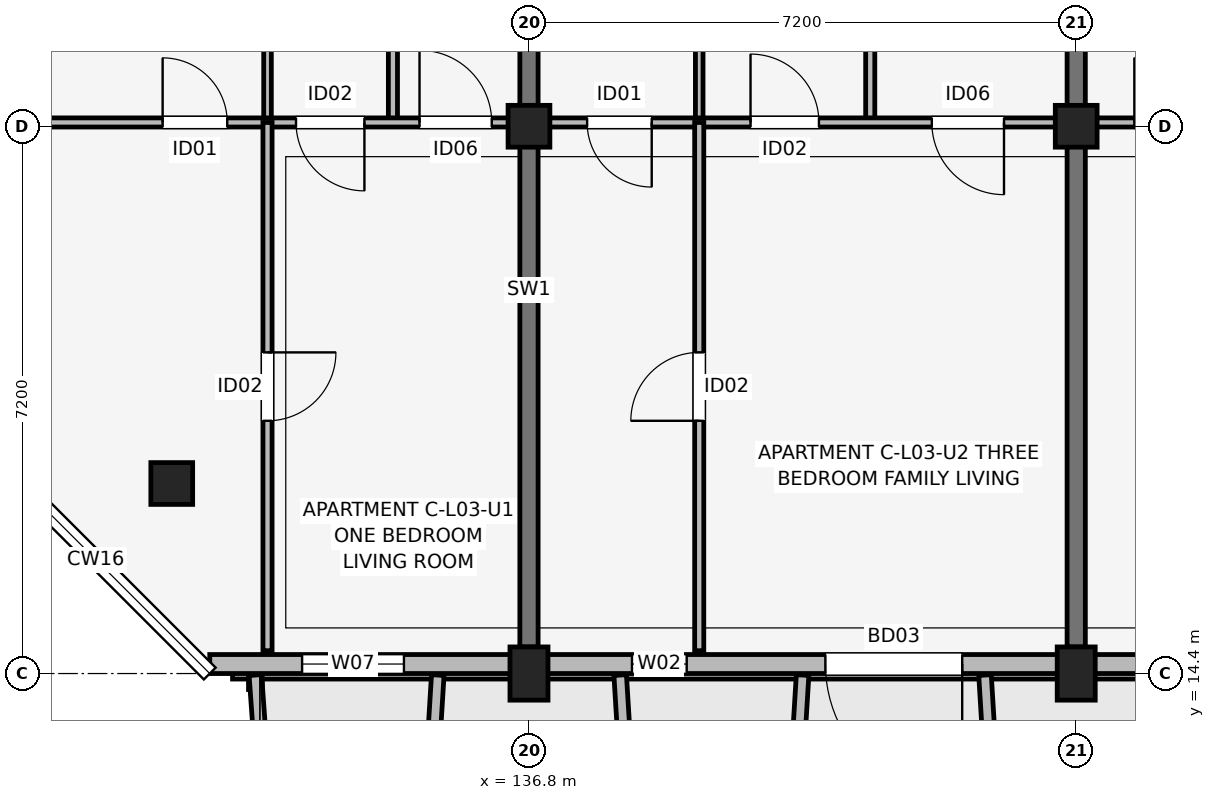
"""IFC4 building model, lengths in metres.
Left out: names, types, materials, properties, quantities, classifications, styles, units other than length and angle.
Written with IfcOpenShell. Run it as: python <this file> out.ifc"""

import sys

from ifc_helpers import new_model, si_unit, direction, frame, frame_2d, origin, origin_2d, place, context, subcontext, project, spatial, rectangle, extrude, element, fill, save


model = new_model("IFC4")
c1 = context("Model", 3, precision=1e-05, world=origin(), true_north=direction((0.0, 1.0)))
c2 = subcontext(c1, "Body", "Model", "MODEL_VIEW")
j1 = project(units=[si_unit("LENGTHUNIT", "METRE"), si_unit("PLANEANGLEUNIT", "RADIAN")], contexts=[c1])
p1 = place(None, origin())
s1 = spatial("IfcSite", under=j1, at=p1, CompositionType="ELEMENT")
p2 = place(p1, origin())
s2 = spatial("IfcBuilding", under=s1, at=p2, CompositionType="ELEMENT")
p3 = place(p2, frame((0.0, 0.0, 11.85)))
s3 = spatial("IfcBuildingStorey", under=s2, at=p3, CompositionType="ELEMENT", Elevation=11.85)
p4 = place(p3, frame((132.1, 16.9, 0.0), z_axis=(0.0, 0.0, 1.0), x_axis=(1.0, 0.0, 0.0)))
e1 = element("IfcColumn", 1, at=p4, inside=s3, PredefinedType="COLUMN", context=c2, shape_type="SweptSolid", body=[
    extrude(rectangle(XDim=0.55, YDim=0.55, at=origin_2d()), origin(), (0.0, 0.0, 1.0), 3.15),
])
p5 = place(p3, frame((136.8, 14.4, 0.0), z_axis=(0.0, 0.0, 1.0), x_axis=(1.0, 0.0, 0.0)))
e2 = element("IfcColumn", 2, at=p5, inside=s3, PredefinedType="COLUMN", context=c2, shape_type="SweptSolid", body=[
    extrude(rectangle(XDim=0.5, YDim=0.7, at=origin_2d()), origin(), (0.0, 0.0, 1.0), 3.15),
])
p6 = place(p3, frame((136.8, 21.6, 0.0), z_axis=(0.0, 0.0, 1.0), x_axis=(1.0, 0.0, 0.0)))
e3 = element("IfcColumn", 3, at=p6, inside=s3, PredefinedType="COLUMN", context=c2, shape_type="SweptSolid", body=[
    extrude(rectangle(XDim=0.55, YDim=0.55, at=origin_2d()), origin(), (0.0, 0.0, 1.0), 3.15),
])
p7 = place(p3, frame((144.0, 14.4, 0.0), z_axis=(0.0, 0.0, 1.0), x_axis=(1.0, 0.0, 0.0)))
e4 = element("IfcColumn", 4, at=p7, inside=s3, PredefinedType="COLUMN", context=c2, shape_type="SweptSolid", body=[
    extrude(rectangle(XDim=0.5, YDim=0.7, at=origin_2d()), origin(), (0.0, 0.0, 1.0), 3.15),
])
p8 = place(p3, frame((144.0, 21.6, 0.0), z_axis=(0.0, 0.0, 1.0), x_axis=(1.0, 0.0, 0.0)))
e5 = element("IfcColumn", 5, at=p8, inside=s3, PredefinedType="COLUMN", context=c2, shape_type="SweptSolid", body=[
    extrude(rectangle(XDim=0.55, YDim=0.55, at=origin_2d()), origin(), (0.0, 0.0, 1.0), 3.15),
])
for number, where, z_axis, x_axis in (
    (6, (136.8, 14.75, 0.0), (0.0, 0.0, 1.0), (0.0, 1.0, 0.0)),
    (7, (144.0, 14.75, 0.0), (0.0, 0.0, 1.0), (0.0, 1.0, 0.0)),
):
    element("IfcWall", number, at=place(p3, frame(where, z_axis=z_axis, x_axis=x_axis)), inside=s3, PredefinedType="SHEAR", context=c2, shape_type="SweptSolid", body=[
        extrude(rectangle(XDim=9.4, YDim=0.24, at=frame_2d((4.7, 0.0))), origin(), (0.0, 0.0, 1.0), 3.15),
    ])
p9 = place(p3, frame((132.6, 14.525, 0.0), z_axis=(0.0, 0.0, 1.0), x_axis=(1.0, 0.0, 0.0)))
e8 = element("IfcWall", 8, at=p9, inside=s3, PredefinedType="SOLIDWALL", context=c2, shape_type="SweptSolid", body=[
    extrude(rectangle(XDim=30.0, YDim=0.25, at=frame_2d((15.0, 0.0))), origin(), (0.0, 0.0, 1.0), 2.43),
])
p10 = place(p9, frame((9.9, 0.0, 0.0), z_axis=(0.0, 0.0, 1.0), x_axis=(-1.0, 0.0, 0.0)))
e9 = element("IfcOpeningElement", 9, at=p10, cuts=e8, PredefinedType="OPENING", context=c2, shape_type="SweptSolid", body=[
    extrude(rectangle(XDim=1.8, YDim=2.15, at=frame_2d((0.9, 1.075))), frame((0.0, 0.135, 0.0), z_axis=(0.0, -1.0, 0.0), x_axis=(1.0, 0.0, 0.0)), (0.0, 0.0, 1.0), 0.27),
])
p11 = place(p9, frame((24.225, 0.0, 0.0), z_axis=(0.0, 0.0, 1.0), x_axis=(-1.0, 0.0, 0.0)))
e10 = element("IfcOpeningElement", 10, at=p11, cuts=e8, PredefinedType="OPENING", context=c2, shape_type="SweptSolid", body=[
    extrude(rectangle(XDim=1.65, YDim=2.15, at=frame_2d((0.825, 1.075))), frame((0.0, 0.135, 0.0), z_axis=(0.0, -1.0, 0.0), x_axis=(1.0, 0.0, 0.0)), (0.0, 0.0, 1.0), 0.27),
])
p12 = place(p9, frame((1.215, 0.0, 0.75)))
e11 = element("IfcOpeningElement", 11, at=p12, cuts=e8, PredefinedType="OPENING", context=c2, shape_type="SweptSolid", body=[
    extrude(rectangle(XDim=1.34, YDim=1.55, at=frame_2d((0.67, 0.775))), frame((0.0, 0.135, 0.0), z_axis=(0.0, -1.0, 0.0), x_axis=(1.0, 0.0, 0.0)), (0.0, 0.0, 1.0), 0.27),
])
p13 = place(p9, frame((5.555, 0.0, 0.75)))
e12 = element("IfcOpeningElement", 12, at=p13, cuts=e8, PredefinedType="OPENING", context=c2, shape_type="SweptSolid", body=[
    extrude(rectangle(XDim=0.72, YDim=1.35, at=frame_2d((0.36, 0.675))), frame((0.0, 0.135, 0.0), z_axis=(0.0, -1.0, 0.0), x_axis=(1.0, 0.0, 0.0)), (0.0, 0.0, 1.0), 0.27),
])
p14 = place(p9, frame((12.94, 0.0, 0.7)))
e13 = element("IfcOpeningElement", 13, at=p14, cuts=e8, PredefinedType="OPENING", context=c2, shape_type="SweptSolid", body=[
    extrude(rectangle(XDim=1.72, YDim=1.6, at=frame_2d((0.86, 0.8))), frame((0.0, 0.135, 0.0), z_axis=(0.0, -1.0, 0.0), x_axis=(1.0, 0.0, 0.0)), (0.0, 0.0, 1.0), 0.27),
])
p15 = place(p9, frame((19.955, 0.0, 0.75)))
e14 = element("IfcOpeningElement", 14, at=p15, cuts=e8, PredefinedType="OPENING", context=c2, shape_type="SweptSolid", body=[
    extrude(rectangle(XDim=0.72, YDim=1.35, at=frame_2d((0.36, 0.675))), frame((0.0, 0.135, 0.0), z_axis=(0.0, -1.0, 0.0), x_axis=(1.0, 0.0, 0.0)), (0.0, 0.0, 1.0), 0.27),
])
p16 = place(p9, frame((27.2, 0.0, 0.67)))
e15 = element("IfcOpeningElement", 15, at=p16, cuts=e8, PredefinedType="OPENING", context=c2, shape_type="SweptSolid", body=[
    extrude(rectangle(XDim=2.0, YDim=1.65, at=frame_2d((1.0, 0.825))), frame((0.0, 0.135, 0.0), z_axis=(0.0, -1.0, 0.0), x_axis=(1.0, 0.0, 0.0)), (0.0, 0.0, 1.0), 0.27),
])
p17 = place(p3, frame((133.2, 14.38, 0.0), z_axis=(0.0, 0.0, 1.0), x_axis=(0.071317687608, -0.997453651772, 0.0)))
e16 = element("IfcWall", 16, at=p17, inside=s3, PredefinedType="ELEMENTEDWALL", context=c2, shape_type="SweptSolid", body=[
    extrude(rectangle(XDim=1.965, YDim=0.165, at=frame_2d((0.982, 0.0))), origin(), (0.0, 0.0, 1.0), 2.95),
])
p18 = place(p3, frame((135.6, 14.38, 0.0), z_axis=(0.0, 0.0, 1.0), x_axis=(-0.061170732449, -0.998127317276, 0.0)))
e17 = element("IfcWall", 17, at=p18, inside=s3, PredefinedType="ELEMENTEDWALL", context=c2, shape_type="SweptSolid", body=[
    extrude(rectangle(XDim=1.964, YDim=0.165, at=frame_2d((0.982, 0.0))), origin(), (0.0, 0.0, 1.0), 2.95),
])
for number, where, z_axis, x_axis in (
    (18, (138.0, 14.38, 0.0), (0.0, 0.0, 1.0), (0.061, -0.998, 0.0)),
    (19, (140.4, 14.38, 0.0), (0.0, 0.0, 1.0), (-0.061, -0.998, 0.0)),
    (20, (142.8, 14.38, 0.0), (0.0, 0.0, 1.0), (0.061, -0.998, 0.0)),
):
    element("IfcWall", number, at=place(p3, frame(where, z_axis=z_axis, x_axis=x_axis)), inside=s3, PredefinedType="ELEMENTEDWALL", context=c2, shape_type="SweptSolid", body=[
        extrude(rectangle(XDim=1.964, YDim=0.165, at=frame_2d((0.982, 0.0))), origin(), (0.0, 0.0, 1.0), 2.48),
    ])
p19 = place(p3, frame((133.36, 21.65, 0.0), z_axis=(0.0, 0.0, 1.0), x_axis=(0.0, 1.0, 0.0)))
e21 = element("IfcWall", 21, at=p19, inside=s3, PredefinedType="PARTITIONING", context=c2, shape_type="SweptSolid", body=[
    extrude(rectangle(XDim=2.65, YDim=0.1, at=frame_2d((1.325, 0.0))), origin(), (0.0, 0.0, 1.0), 2.375),
])
p20 = place(p3, frame((135.01, 21.65, 0.0), z_axis=(0.0, 0.0, 1.0), x_axis=(0.0, 1.0, 0.0)))
e22 = element("IfcWall", 22, at=p20, inside=s3, PredefinedType="PARTITIONING", context=c2, shape_type="SweptSolid", body=[
    extrude(rectangle(XDim=2.65, YDim=0.12, at=frame_2d((1.325, 0.0))), origin(), (0.0, 0.0, 1.0), 2.375),
])
p21 = place(p3, frame((129.74, 21.65, 0.0), z_axis=(0.0, 0.0, 1.0), x_axis=(1.0, 0.0, 0.0)))
e23 = element("IfcWall", 23, at=p21, inside=s3, PredefinedType="PARTITIONING", context=c2, shape_type="SweptSolid", body=[
    extrude(rectangle(XDim=6.92, YDim=0.12, at=frame_2d((3.46, 0.0))), origin(), (0.0, 0.0, 1.0), 2.375),
])
p22 = place(p21, frame((2.24, 0.0, 0.0)))
e24 = element("IfcOpeningElement", 24, at=p22, cuts=e23, PredefinedType="OPENING", context=c2, shape_type="SweptSolid", body=[
    extrude(rectangle(XDim=0.85, YDim=2.08, at=frame_2d((0.425, 1.04))), frame((0.0, 0.07, 0.0), z_axis=(0.0, -1.0, 0.0), x_axis=(1.0, 0.0, 0.0)), (0.0, 0.0, 1.0), 0.14),
])
p23 = place(p21, frame((4.895, 0.0, 0.0), z_axis=(0.0, 0.0, 1.0), x_axis=(-1.0, 0.0, 0.0)))
e25 = element("IfcOpeningElement", 25, at=p23, cuts=e23, PredefinedType="OPENING", context=c2, shape_type="SweptSolid", body=[
    extrude(rectangle(XDim=0.9, YDim=2.08, at=frame_2d((0.45, 1.04))), frame((0.0, 0.07, 0.0), z_axis=(0.0, -1.0, 0.0), x_axis=(1.0, 0.0, 0.0)), (0.0, 0.0, 1.0), 0.14),
])
p24 = place(p21, frame((5.62, 0.0, 0.0)))
e26 = element("IfcOpeningElement", 26, at=p24, cuts=e23, PredefinedType="OPENING", context=c2, shape_type="SweptSolid", body=[
    extrude(rectangle(XDim=0.95, YDim=2.08, at=frame_2d((0.475, 1.04))), frame((0.0, 0.07, 0.0), z_axis=(0.0, -1.0, 0.0), x_axis=(1.0, 0.0, 0.0)), (0.0, 0.0, 1.0), 0.14),
])
p25 = place(p3, frame((133.36, 14.7, 0.0), z_axis=(0.0, 0.0, 1.0), x_axis=(0.0, 1.0, 0.0)))
e27 = element("IfcWall", 27, at=p25, inside=s3, PredefinedType="PARTITIONING", context=c2, shape_type="SweptSolid", body=[
    extrude(rectangle(XDim=6.95, YDim=0.12, at=frame_2d((3.475, 0.0))), origin(), (0.0, 0.0, 1.0), 2.375),
])
p26 = place(p25, frame((3.925, 0.0, 0.0), z_axis=(0.0, 0.0, 1.0), x_axis=(-1.0, 0.0, 0.0)))
e28 = element("IfcOpeningElement", 28, at=p26, cuts=e27, PredefinedType="OPENING", context=c2, shape_type="SweptSolid", body=[
    extrude(rectangle(XDim=0.9, YDim=2.08, at=frame_2d((0.45, 1.04))), frame((0.0, 0.07, 0.0), z_axis=(0.0, -1.0, 0.0), x_axis=(1.0, 0.0, 0.0)), (0.0, 0.0, 1.0), 0.14),
])
p27 = place(p3, frame((139.04, 21.65, 0.0), z_axis=(0.0, 0.0, 1.0), x_axis=(0.0, 1.0, 0.0)))
e29 = element("IfcWall", 29, at=p27, inside=s3, PredefinedType="PARTITIONING", context=c2, shape_type="SweptSolid", body=[
    extrude(rectangle(XDim=2.65, YDim=0.1, at=frame_2d((1.325, 0.0))), origin(), (0.0, 0.0, 1.0), 2.375),
])
p28 = place(p3, frame((141.29, 21.65, 0.0), z_axis=(0.0, 0.0, 1.0), x_axis=(0.0, 1.0, 0.0)))
e30 = element("IfcWall", 30, at=p28, inside=s3, PredefinedType="PARTITIONING", context=c2, shape_type="SweptSolid", body=[
    extrude(rectangle(XDim=2.65, YDim=0.12, at=frame_2d((1.325, 0.0))), origin(), (0.0, 0.0, 1.0), 2.375),
])
p29 = place(p3, frame((136.94, 21.65, 0.0), z_axis=(0.0, 0.0, 1.0), x_axis=(1.0, 0.0, 0.0)))
e31 = element("IfcWall", 31, at=p29, inside=s3, PredefinedType="PARTITIONING", context=c2, shape_type="SweptSolid", body=[
    extrude(rectangle(XDim=6.92, YDim=0.12, at=frame_2d((3.46, 0.0))), origin(), (0.0, 0.0, 1.0), 2.375),
])
p30 = place(p29, frame((1.475, 0.0, 0.0), z_axis=(0.0, 0.0, 1.0), x_axis=(-1.0, 0.0, 0.0)))
e32 = element("IfcOpeningElement", 32, at=p30, cuts=e31, PredefinedType="OPENING", context=c2, shape_type="SweptSolid", body=[
    extrude(rectangle(XDim=0.85, YDim=2.08, at=frame_2d((0.425, 1.04))), frame((0.0, 0.07, 0.0), z_axis=(0.0, -1.0, 0.0), x_axis=(1.0, 0.0, 0.0)), (0.0, 0.0, 1.0), 0.14),
])
p31 = place(p29, frame((2.775, 0.0, 0.0)))
e33 = element("IfcOpeningElement", 33, at=p31, cuts=e31, PredefinedType="OPENING", context=c2, shape_type="SweptSolid", body=[
    extrude(rectangle(XDim=0.9, YDim=2.08, at=frame_2d((0.45, 1.04))), frame((0.0, 0.07, 0.0), z_axis=(0.0, -1.0, 0.0), x_axis=(1.0, 0.0, 0.0)), (0.0, 0.0, 1.0), 0.14),
])
p32 = place(p29, frame((6.11, 0.0, 0.0), z_axis=(0.0, 0.0, 1.0), x_axis=(-1.0, 0.0, 0.0)))
e34 = element("IfcOpeningElement", 34, at=p32, cuts=e31, PredefinedType="OPENING", context=c2, shape_type="SweptSolid", body=[
    extrude(rectangle(XDim=0.95, YDim=2.08, at=frame_2d((0.475, 1.04))), frame((0.0, 0.07, 0.0), z_axis=(0.0, -1.0, 0.0), x_axis=(1.0, 0.0, 0.0)), (0.0, 0.0, 1.0), 0.14),
])
p33 = place(p3, frame((139.04, 14.7, 0.0), z_axis=(0.0, 0.0, 1.0), x_axis=(0.0, 1.0, 0.0)))
e35 = element("IfcWall", 35, at=p33, inside=s3, PredefinedType="PARTITIONING", context=c2, shape_type="SweptSolid", body=[
    extrude(rectangle(XDim=6.95, YDim=0.12, at=frame_2d((3.475, 0.0))), origin(), (0.0, 0.0, 1.0), 2.375),
])
p34 = place(p33, frame((3.025, 0.0, 0.0)))
e36 = element("IfcOpeningElement", 36, at=p34, cuts=e35, PredefinedType="OPENING", context=c2, shape_type="SweptSolid", body=[
    extrude(rectangle(XDim=0.9, YDim=2.08, at=frame_2d((0.45, 1.04))), frame((0.0, 0.07, 0.0), z_axis=(0.0, -1.0, 0.0), x_axis=(1.0, 0.0, 0.0)), (0.0, 0.0, 1.0), 0.14),
])
p35 = place(p3, frame((144.14, 21.65, 0.0), z_axis=(0.0, 0.0, 1.0), x_axis=(1.0, 0.0, 0.0)))
e37 = element("IfcWall", 37, at=p35, inside=s3, PredefinedType="PARTITIONING", context=c2, shape_type="SweptSolid", body=[
    extrude(rectangle(XDim=6.92, YDim=0.12, at=frame_2d((3.46, 0.0))), origin(), (0.0, 0.0, 1.0), 2.375),
])
p36 = place(p35, frame((0.625, 0.0, 0.0)))
e38 = element("IfcOpeningElement", 38, at=p36, cuts=e37, PredefinedType="OPENING", context=c2, shape_type="SweptSolid", body=[
    extrude(rectangle(XDim=0.85, YDim=2.08, at=frame_2d((0.425, 1.04))), frame((0.0, 0.07, 0.0), z_axis=(0.0, -1.0, 0.0), x_axis=(1.0, 0.0, 0.0)), (0.0, 0.0, 1.0), 0.14),
])
p37 = place(p35, frame((3.525, 0.0, 0.0), z_axis=(0.0, 0.0, 1.0), x_axis=(-1.0, 0.0, 0.0)))
e39 = element("IfcOpeningElement", 39, at=p37, cuts=e37, PredefinedType="OPENING", context=c2, shape_type="SweptSolid", body=[
    extrude(rectangle(XDim=0.9, YDim=2.08, at=frame_2d((0.45, 1.04))), frame((0.0, 0.07, 0.0), z_axis=(0.0, -1.0, 0.0), x_axis=(1.0, 0.0, 0.0)), (0.0, 0.0, 1.0), 0.14),
])
p38 = place(p35, frame((5.01, 0.0, 0.0)))
e40 = element("IfcOpeningElement", 40, at=p38, cuts=e37, PredefinedType="OPENING", context=c2, shape_type="SweptSolid", body=[
    extrude(rectangle(XDim=0.95, YDim=2.08, at=frame_2d((0.475, 1.04))), frame((0.0, 0.07, 0.0), z_axis=(0.0, -1.0, 0.0), x_axis=(1.0, 0.0, 0.0)), (0.0, 0.0, 1.0), 0.14),
])
p39 = place(p10, origin())
e41 = element("IfcDoor", 41, at=p39, inside=s3, OperationType="SINGLE_SWING_RIGHT", PredefinedType="DOOR", context=c2, shape_type="SweptSolid", body=[
    extrude(rectangle(XDim=1.8, YDim=2.15, at=frame_2d((0.9, 1.075))), frame((0.0, 0.025, 0.0), z_axis=(0.0, -1.0, 0.0), x_axis=(1.0, 0.0, 0.0)), (0.0, 0.0, 1.0), 0.05),
])
fill(e9, e41)
p40 = place(p12, origin())
e42 = element("IfcWindow", 42, at=p40, inside=s3, PartitioningType="SINGLE_PANEL", PredefinedType="WINDOW", context=c2, shape_type="SweptSolid", body=[
    extrude(rectangle(XDim=1.34, YDim=1.55, at=frame_2d((0.67, 0.775))), frame((0.0, 0.03, 0.0), z_axis=(0.0, -1.0, 0.0), x_axis=(1.0, 0.0, 0.0)), (0.0, 0.0, 1.0), 0.06),
])
fill(e11, e42)
p41 = place(p13, origin())
e43 = element("IfcWindow", 43, at=p41, inside=s3, PartitioningType="SINGLE_PANEL", PredefinedType="WINDOW", context=c2, shape_type="SweptSolid", body=[
    extrude(rectangle(XDim=0.72, YDim=1.35, at=frame_2d((0.36, 0.675))), frame((0.0, 0.03, 0.0), z_axis=(0.0, -1.0, 0.0), x_axis=(1.0, 0.0, 0.0)), (0.0, 0.0, 1.0), 0.06),
])
fill(e12, e43)
p42 = place(p22, origin())
e44 = element("IfcDoor", 44, at=p42, inside=s3, OperationType="SINGLE_SWING_LEFT", PredefinedType="DOOR", context=c2, shape_type="SweptSolid", body=[
    extrude(rectangle(XDim=0.85, YDim=2.08, at=frame_2d((0.425, 1.04))), frame((0.0, 0.025, 0.0), z_axis=(0.0, -1.0, 0.0), x_axis=(1.0, 0.0, 0.0)), (0.0, 0.0, 1.0), 0.05),
])
fill(e24, e44)
p43 = place(p23, origin())
e45 = element("IfcDoor", 45, at=p43, inside=s3, OperationType="SINGLE_SWING_RIGHT", PredefinedType="DOOR", context=c2, shape_type="SweptSolid", body=[
    extrude(rectangle(XDim=0.9, YDim=2.08, at=frame_2d((0.45, 1.04))), frame((0.0, 0.025, 0.0), z_axis=(0.0, -1.0, 0.0), x_axis=(1.0, 0.0, 0.0)), (0.0, 0.0, 1.0), 0.05),
])
fill(e25, e45)
p44 = place(p24, origin())
e46 = element("IfcDoor", 46, at=p44, inside=s3, OperationType="SINGLE_SWING_LEFT", PredefinedType="DOOR", context=c2, shape_type="SweptSolid", body=[
    extrude(rectangle(XDim=0.95, YDim=2.08, at=frame_2d((0.475, 1.04))), frame((0.0, 0.025, 0.0), z_axis=(0.0, -1.0, 0.0), x_axis=(1.0, 0.0, 0.0)), (0.0, 0.0, 1.0), 0.05),
])
fill(e26, e46)
p45 = place(p26, origin())
e47 = element("IfcDoor", 47, at=p45, inside=s3, OperationType="SINGLE_SWING_RIGHT", PredefinedType="DOOR", context=c2, shape_type="SweptSolid", body=[
    extrude(rectangle(XDim=0.9, YDim=2.08, at=frame_2d((0.45, 1.04))), frame((0.0, 0.025, 0.0), z_axis=(0.0, -1.0, 0.0), x_axis=(1.0, 0.0, 0.0)), (0.0, 0.0, 1.0), 0.05),
])
fill(e28, e47)
p46 = place(p30, origin())
e48 = element("IfcDoor", 48, at=p46, inside=s3, OperationType="SINGLE_SWING_RIGHT", PredefinedType="DOOR", context=c2, shape_type="SweptSolid", body=[
    extrude(rectangle(XDim=0.85, YDim=2.08, at=frame_2d((0.425, 1.04))), frame((0.0, 0.025, 0.0), z_axis=(0.0, -1.0, 0.0), x_axis=(1.0, 0.0, 0.0)), (0.0, 0.0, 1.0), 0.05),
])
fill(e32, e48)
p47 = place(p31, origin())
e49 = element("IfcDoor", 49, at=p47, inside=s3, OperationType="SINGLE_SWING_LEFT", PredefinedType="DOOR", context=c2, shape_type="SweptSolid", body=[
    extrude(rectangle(XDim=0.9, YDim=2.08, at=frame_2d((0.45, 1.04))), frame((0.0, 0.025, 0.0), z_axis=(0.0, -1.0, 0.0), x_axis=(1.0, 0.0, 0.0)), (0.0, 0.0, 1.0), 0.05),
])
fill(e33, e49)
p48 = place(p32, origin())
e50 = element("IfcDoor", 50, at=p48, inside=s3, OperationType="SINGLE_SWING_RIGHT", PredefinedType="DOOR", context=c2, shape_type="SweptSolid", body=[
    extrude(rectangle(XDim=0.95, YDim=2.08, at=frame_2d((0.475, 1.04))), frame((0.0, 0.025, 0.0), z_axis=(0.0, -1.0, 0.0), x_axis=(1.0, 0.0, 0.0)), (0.0, 0.0, 1.0), 0.05),
])
fill(e34, e50)
p49 = place(p34, origin())
e51 = element("IfcDoor", 51, at=p49, inside=s3, OperationType="SINGLE_SWING_LEFT", PredefinedType="DOOR", context=c2, shape_type="SweptSolid", body=[
    extrude(rectangle(XDim=0.9, YDim=2.08, at=frame_2d((0.45, 1.04))), frame((0.0, 0.025, 0.0), z_axis=(0.0, -1.0, 0.0), x_axis=(1.0, 0.0, 0.0)), (0.0, 0.0, 1.0), 0.05),
])
fill(e36, e51)
p50 = place(p36, origin())
e52 = element("IfcDoor", 52, at=p50, inside=s3, OperationType="SINGLE_SWING_LEFT", PredefinedType="DOOR", context=c2, shape_type="SweptSolid", body=[
    extrude(rectangle(XDim=0.85, YDim=2.08, at=frame_2d((0.425, 1.04))), frame((0.0, 0.025, 0.0), z_axis=(0.0, -1.0, 0.0), x_axis=(1.0, 0.0, 0.0)), (0.0, 0.0, 1.0), 0.05),
])
fill(e38, e52)
save(model, sys.argv[1])
